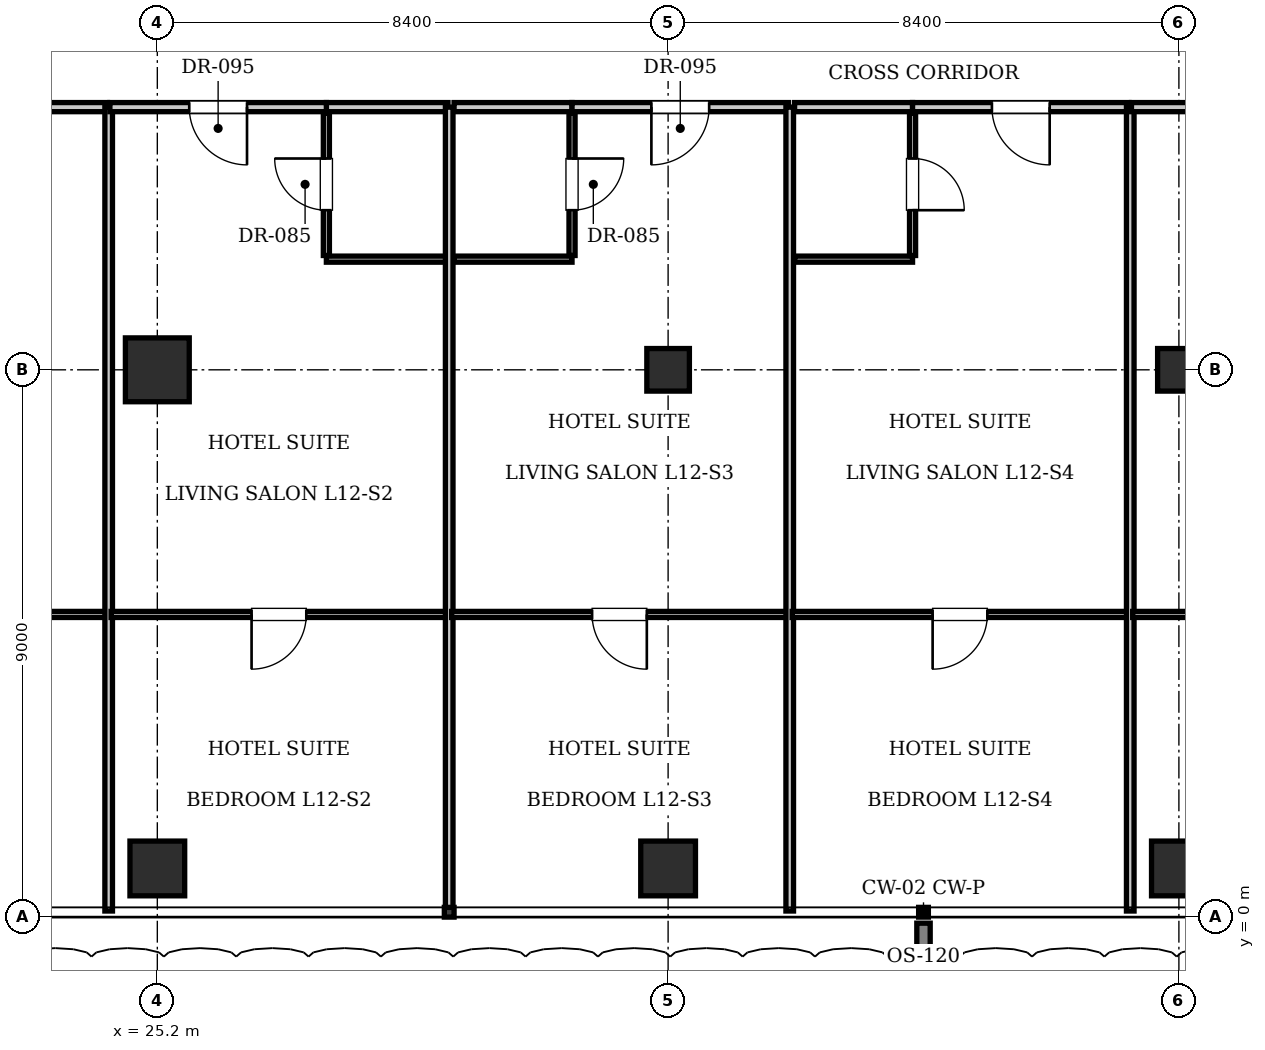
"""IFC4 building model, lengths in metres.
Left out: names, types, materials, properties, quantities, classifications, styles, units other than length and angle.
Written with IfcOpenShell. Run it as: python <this file> out.ifc"""

import sys

from ifc_helpers import new_model, si_unit, direction, frame, frame_2d, origin, origin_2d, place, context, subcontext, project, spatial, rectangle, i_section, extrude, element, fill, save


model = new_model("IFC4")
c1 = context("Model", 3, precision=1e-05, world=origin(), true_north=direction((0.0, 1.0)))
c2 = subcontext(c1, "Body", "Model", "MODEL_VIEW")
j1 = project(units=[si_unit("LENGTHUNIT", "METRE"), si_unit("PLANEANGLEUNIT", "RADIAN")], contexts=[c1])
p1 = place(None, origin())
s1 = spatial("IfcSite", under=j1, at=p1, CompositionType="ELEMENT")
p2 = place(p1, origin())
s2 = spatial("IfcBuilding", under=s1, at=p2, CompositionType="ELEMENT")
p3 = place(p2, frame((0.0, 0.0, 53.9)))
s3 = spatial("IfcBuildingStorey", under=s2, at=p3, CompositionType="ELEMENT", Elevation=53.9)
p4 = place(p3, frame((25.2, 9.0, 0.0), z_axis=(0.0, 0.0, 1.0), x_axis=(1.0, 0.0, 0.0)))
e1 = element("IfcColumn", 1, at=p4, inside=s3, PredefinedType="COLUMN", context=c2, shape_type="SweptSolid", body=[
    extrude(rectangle(XDim=1.05, YDim=1.05, at=origin_2d()), origin(), (0.0, 0.0, 1.0), 3.85),
])
for number, where, z_axis, x_axis in (
    (2, (33.6, 9.0, 0.0), (0.0, 0.0, 1.0), (1.0, 0.0, 0.0)),
    (3, (42.0, 9.0, 0.0), (0.0, 0.0, 1.0), (1.0, 0.0, 0.0)),
):
    element("IfcColumn", number, at=place(p3, frame(where, z_axis=z_axis, x_axis=x_axis)), inside=s3, PredefinedType="COLUMN", context=c2, shape_type="SweptSolid", body=[
        extrude(i_section(OverallWidth=0.7, OverallDepth=0.7, WebThickness=0.028, FlangeThickness=0.044, at=origin_2d()), origin(), (0.0, 0.0, 1.0), 3.85),
    ])
for number, where, z_axis, x_axis in (
    (4, (25.2, 0.8, 0.0), (0.0, 0.0, 1.0), (1.0, 0.0, 0.0)),
    (5, (33.6, 0.8, 0.0), (0.0, 0.0, 1.0), (1.0, 0.0, 0.0)),
    (6, (42.0, 0.8, 0.0), (0.0, 0.0, 1.0), (1.0, 0.0, 0.0)),
):
    element("IfcColumn", number, at=place(p3, frame(where, z_axis=z_axis, x_axis=x_axis)), inside=s3, PredefinedType="COLUMN", context=c2, shape_type="SweptSolid", body=[
        extrude(rectangle(XDim=0.9, YDim=0.9, at=origin_2d()), origin(), (0.0, 0.0, 1.0), 3.85),
    ])
p5 = place(p3, frame((20.82, 13.32, 0.0), z_axis=(0.0, 0.0, 1.0), x_axis=(1.0, 0.0, 0.0)))
e7 = element("IfcWall", 7, at=p5, inside=s3, PredefinedType="PARTITIONING", context=c2, shape_type="SweptSolid", body=[
    extrude(rectangle(XDim=3.56, YDim=0.15, at=frame_2d((1.78, 0.0))), origin(), (0.0, 0.0, 1.0), 3.61),
])
p6 = place(p5, frame((1.305, 0.0, 0.0)))
e8 = element("IfcOpeningElement", 8, at=p6, cuts=e7, PredefinedType="OPENING", context=c2, shape_type="SweptSolid", body=[
    extrude(rectangle(XDim=0.95, YDim=2.15, at=frame_2d((0.475, 1.075))), frame((0.0, 0.085, 0.0), z_axis=(0.0, -1.0, 0.0), x_axis=(1.0, 0.0, 0.0)), (0.0, 0.0, 1.0), 0.17),
])
p7 = place(p3, frame((18.84, 4.977, 0.0), z_axis=(0.0, 0.0, 1.0), x_axis=(1.0, 0.0, 0.0)))
e9 = element("IfcWall", 9, at=p7, inside=s3, PredefinedType="PARTITIONING", context=c2, shape_type="SweptSolid", body=[
    extrude(rectangle(XDim=5.52, YDim=0.1, at=frame_2d((2.76, 0.0))), origin(), (0.0, 0.0, 1.0), 3.61),
])
p8 = place(p7, frame((2.31, 0.0, 0.0)))
e10 = element("IfcOpeningElement", 10, at=p8, cuts=e9, PredefinedType="OPENING", context=c2, shape_type="SweptSolid", body=[
    extrude(rectangle(XDim=0.9, YDim=2.1, at=frame_2d((0.45, 1.05))), frame((0.0, 0.06, 0.0), z_axis=(0.0, -1.0, 0.0), x_axis=(1.0, 0.0, 0.0)), (0.0, 0.0, 1.0), 0.12),
])
p9 = place(p3, frame((24.4, 0.1, 0.0), z_axis=(0.0, 0.0, 1.0), x_axis=(0.0, 1.0, 0.0)))
e11 = element("IfcWall", 11, at=p9, inside=s3, PredefinedType="PARTITIONING", context=c2, shape_type="SweptSolid", body=[
    extrude(rectangle(XDim=13.22, YDim=0.125, at=frame_2d((6.61, 0.0))), origin(), (0.0, 0.0, 1.0), 3.61),
])
p10 = place(p3, frame((27.98, 13.32, 0.0), z_axis=(0.0, 0.0, 1.0), x_axis=(1.0, 0.0, 0.0)))
e12 = element("IfcWall", 12, at=p10, inside=s3, PredefinedType="PARTITIONING", context=c2, shape_type="SweptSolid", body=[
    extrude(rectangle(XDim=2.0, YDim=0.15, at=frame_2d((1.0, 0.0))), origin(), (0.0, 0.0, 1.0), 3.61),
])
p11 = place(p3, frame((27.98, 10.82, 0.0), z_axis=(0.0, 0.0, 1.0), x_axis=(1.0, 0.0, 0.0)))
e13 = element("IfcWall", 13, at=p11, inside=s3, PredefinedType="PARTITIONING", context=c2, shape_type="SweptSolid", body=[
    extrude(rectangle(XDim=1.98, YDim=0.1, at=frame_2d((0.99, 0.0))), origin(), (0.0, 0.0, 1.0), 3.61),
])
p12 = place(p3, frame((27.98, 10.88, 0.0), z_axis=(0.0, 0.0, 1.0), x_axis=(0.0, 1.0, 0.0)))
e14 = element("IfcWall", 14, at=p12, inside=s3, PredefinedType="PARTITIONING", context=c2, shape_type="SweptSolid", body=[
    extrude(rectangle(XDim=2.34, YDim=0.1, at=frame_2d((1.17, 0.0))), origin(), (0.0, 0.0, 1.0), 3.61),
])
p13 = place(p12, frame((0.745, 0.0, 0.0)))
e15 = element("IfcOpeningElement", 15, at=p13, cuts=e14, PredefinedType="OPENING", context=c2, shape_type="SweptSolid", body=[
    extrude(rectangle(XDim=0.85, YDim=2.1, at=frame_2d((0.425, 1.05))), frame((0.0, 0.06, 0.0), z_axis=(0.0, -1.0, 0.0), x_axis=(1.0, 0.0, 0.0)), (0.0, 0.0, 1.0), 0.12),
])
p14 = place(p3, frame((24.42, 13.32, 0.0), z_axis=(0.0, 0.0, 1.0), x_axis=(1.0, 0.0, 0.0)))
e16 = element("IfcWall", 16, at=p14, inside=s3, PredefinedType="PARTITIONING", context=c2, shape_type="SweptSolid", body=[
    extrude(rectangle(XDim=3.56, YDim=0.15, at=frame_2d((1.78, 0.0))), origin(), (0.0, 0.0, 1.0), 3.61),
])
p15 = place(p14, frame((1.305, 0.0, 0.0)))
e17 = element("IfcOpeningElement", 17, at=p15, cuts=e16, PredefinedType="OPENING", context=c2, shape_type="SweptSolid", body=[
    extrude(rectangle(XDim=0.95, YDim=2.15, at=frame_2d((0.475, 1.075))), frame((0.0, 0.085, 0.0), z_axis=(0.0, -1.0, 0.0), x_axis=(1.0, 0.0, 0.0)), (0.0, 0.0, 1.0), 0.17),
])
p16 = place(p3, frame((24.44, 4.977, 0.0), z_axis=(0.0, 0.0, 1.0), x_axis=(1.0, 0.0, 0.0)))
e18 = element("IfcWall", 18, at=p16, inside=s3, PredefinedType="PARTITIONING", context=c2, shape_type="SweptSolid", body=[
    extrude(rectangle(XDim=5.52, YDim=0.1, at=frame_2d((2.76, 0.0))), origin(), (0.0, 0.0, 1.0), 3.61),
])
p17 = place(p16, frame((2.31, 0.0, 0.0)))
e19 = element("IfcOpeningElement", 19, at=p17, cuts=e18, PredefinedType="OPENING", context=c2, shape_type="SweptSolid", body=[
    extrude(rectangle(XDim=0.9, YDim=2.1, at=frame_2d((0.45, 1.05))), frame((0.0, 0.06, 0.0), z_axis=(0.0, -1.0, 0.0), x_axis=(1.0, 0.0, 0.0)), (0.0, 0.0, 1.0), 0.12),
])
p18 = place(p3, frame((30.0, 0.1, 0.0), z_axis=(0.0, 0.0, 1.0), x_axis=(0.0, 1.0, 0.0)))
e20 = element("IfcWall", 20, at=p18, inside=s3, PredefinedType="PARTITIONING", context=c2, shape_type="SweptSolid", body=[
    extrude(rectangle(XDim=13.22, YDim=0.125, at=frame_2d((6.61, 0.0))), origin(), (0.0, 0.0, 1.0), 3.61),
])
p19 = place(p3, frame((30.08, 13.32, 0.0), z_axis=(0.0, 0.0, 1.0), x_axis=(1.0, 0.0, 0.0)))
e21 = element("IfcWall", 21, at=p19, inside=s3, PredefinedType="PARTITIONING", context=c2, shape_type="SweptSolid", body=[
    extrude(rectangle(XDim=1.94, YDim=0.15, at=frame_2d((0.97, 0.0))), origin(), (0.0, 0.0, 1.0), 3.61),
])
p20 = place(p3, frame((30.08, 10.82, 0.0), z_axis=(0.0, 0.0, 1.0), x_axis=(1.0, 0.0, 0.0)))
e22 = element("IfcWall", 22, at=p20, inside=s3, PredefinedType="PARTITIONING", context=c2, shape_type="SweptSolid", body=[
    extrude(rectangle(XDim=1.94, YDim=0.1, at=frame_2d((0.97, 0.0))), origin(), (0.0, 0.0, 1.0), 3.61),
])
p21 = place(p3, frame((32.02, 10.88, 0.0), z_axis=(0.0, 0.0, 1.0), x_axis=(0.0, 1.0, 0.0)))
e23 = element("IfcWall", 23, at=p21, inside=s3, PredefinedType="PARTITIONING", context=c2, shape_type="SweptSolid", body=[
    extrude(rectangle(XDim=2.34, YDim=0.1, at=frame_2d((1.17, 0.0))), origin(), (0.0, 0.0, 1.0), 3.61),
])
p22 = place(p21, frame((0.745, 0.0, 0.0)))
e24 = element("IfcOpeningElement", 24, at=p22, cuts=e23, PredefinedType="OPENING", context=c2, shape_type="SweptSolid", body=[
    extrude(rectangle(XDim=0.85, YDim=2.1, at=frame_2d((0.425, 1.05))), frame((0.0, 0.06, 0.0), z_axis=(0.0, -1.0, 0.0), x_axis=(1.0, 0.0, 0.0)), (0.0, 0.0, 1.0), 0.12),
])
p23 = place(p3, frame((32.02, 13.32, 0.0), z_axis=(0.0, 0.0, 1.0), x_axis=(1.0, 0.0, 0.0)))
e25 = element("IfcWall", 25, at=p23, inside=s3, PredefinedType="PARTITIONING", context=c2, shape_type="SweptSolid", body=[
    extrude(rectangle(XDim=3.56, YDim=0.15, at=frame_2d((1.78, 0.0))), origin(), (0.0, 0.0, 1.0), 3.61),
])
p24 = place(p23, frame((1.305, 0.0, 0.0)))
e26 = element("IfcOpeningElement", 26, at=p24, cuts=e25, PredefinedType="OPENING", context=c2, shape_type="SweptSolid", body=[
    extrude(rectangle(XDim=0.95, YDim=2.15, at=frame_2d((0.475, 1.075))), frame((0.0, 0.085, 0.0), z_axis=(0.0, -1.0, 0.0), x_axis=(1.0, 0.0, 0.0)), (0.0, 0.0, 1.0), 0.17),
])
p25 = place(p3, frame((30.04, 4.977, 0.0), z_axis=(0.0, 0.0, 1.0), x_axis=(1.0, 0.0, 0.0)))
e27 = element("IfcWall", 27, at=p25, inside=s3, PredefinedType="PARTITIONING", context=c2, shape_type="SweptSolid", body=[
    extrude(rectangle(XDim=5.52, YDim=0.1, at=frame_2d((2.76, 0.0))), origin(), (0.0, 0.0, 1.0), 3.61),
])
p26 = place(p25, frame((2.31, 0.0, 0.0)))
e28 = element("IfcOpeningElement", 28, at=p26, cuts=e27, PredefinedType="OPENING", context=c2, shape_type="SweptSolid", body=[
    extrude(rectangle(XDim=0.9, YDim=2.1, at=frame_2d((0.45, 1.05))), frame((0.0, 0.06, 0.0), z_axis=(0.0, -1.0, 0.0), x_axis=(1.0, 0.0, 0.0)), (0.0, 0.0, 1.0), 0.12),
])
p27 = place(p3, frame((35.6, 0.1, 0.0), z_axis=(0.0, 0.0, 1.0), x_axis=(0.0, 1.0, 0.0)))
e29 = element("IfcWall", 29, at=p27, inside=s3, PredefinedType="PARTITIONING", context=c2, shape_type="SweptSolid", body=[
    extrude(rectangle(XDim=13.22, YDim=0.125, at=frame_2d((6.61, 0.0))), origin(), (0.0, 0.0, 1.0), 3.61),
])
p28 = place(p3, frame((35.68, 13.32, 0.0), z_axis=(0.0, 0.0, 1.0), x_axis=(1.0, 0.0, 0.0)))
e30 = element("IfcWall", 30, at=p28, inside=s3, PredefinedType="PARTITIONING", context=c2, shape_type="SweptSolid", body=[
    extrude(rectangle(XDim=1.94, YDim=0.15, at=frame_2d((0.97, 0.0))), origin(), (0.0, 0.0, 1.0), 3.61),
])
p29 = place(p3, frame((35.68, 10.82, 0.0), z_axis=(0.0, 0.0, 1.0), x_axis=(1.0, 0.0, 0.0)))
e31 = element("IfcWall", 31, at=p29, inside=s3, PredefinedType="PARTITIONING", context=c2, shape_type="SweptSolid", body=[
    extrude(rectangle(XDim=1.94, YDim=0.1, at=frame_2d((0.97, 0.0))), origin(), (0.0, 0.0, 1.0), 3.61),
])
p30 = place(p3, frame((37.62, 10.88, 0.0), z_axis=(0.0, 0.0, 1.0), x_axis=(0.0, 1.0, 0.0)))
e32 = element("IfcWall", 32, at=p30, inside=s3, PredefinedType="PARTITIONING", context=c2, shape_type="SweptSolid", body=[
    extrude(rectangle(XDim=2.34, YDim=0.1, at=frame_2d((1.17, 0.0))), origin(), (0.0, 0.0, 1.0), 3.61),
])
p31 = place(p30, frame((0.745, 0.0, 0.0)))
e33 = element("IfcOpeningElement", 33, at=p31, cuts=e32, PredefinedType="OPENING", context=c2, shape_type="SweptSolid", body=[
    extrude(rectangle(XDim=0.85, YDim=2.1, at=frame_2d((0.425, 1.05))), frame((0.0, 0.06, 0.0), z_axis=(0.0, -1.0, 0.0), x_axis=(1.0, 0.0, 0.0)), (0.0, 0.0, 1.0), 0.12),
])
p32 = place(p3, frame((37.62, 13.32, 0.0), z_axis=(0.0, 0.0, 1.0), x_axis=(1.0, 0.0, 0.0)))
e34 = element("IfcWall", 34, at=p32, inside=s3, PredefinedType="PARTITIONING", context=c2, shape_type="SweptSolid", body=[
    extrude(rectangle(XDim=3.56, YDim=0.15, at=frame_2d((1.78, 0.0))), origin(), (0.0, 0.0, 1.0), 3.61),
])
p33 = place(p32, frame((1.305, 0.0, 0.0)))
e35 = element("IfcOpeningElement", 35, at=p33, cuts=e34, PredefinedType="OPENING", context=c2, shape_type="SweptSolid", body=[
    extrude(rectangle(XDim=0.95, YDim=2.15, at=frame_2d((0.475, 1.075))), frame((0.0, 0.085, 0.0), z_axis=(0.0, -1.0, 0.0), x_axis=(1.0, 0.0, 0.0)), (0.0, 0.0, 1.0), 0.17),
])
p34 = place(p3, frame((35.64, 4.977, 0.0), z_axis=(0.0, 0.0, 1.0), x_axis=(1.0, 0.0, 0.0)))
e36 = element("IfcWall", 36, at=p34, inside=s3, PredefinedType="PARTITIONING", context=c2, shape_type="SweptSolid", body=[
    extrude(rectangle(XDim=5.52, YDim=0.1, at=frame_2d((2.76, 0.0))), origin(), (0.0, 0.0, 1.0), 3.61),
])
p35 = place(p34, frame((2.31, 0.0, 0.0)))
e37 = element("IfcOpeningElement", 37, at=p35, cuts=e36, PredefinedType="OPENING", context=c2, shape_type="SweptSolid", body=[
    extrude(rectangle(XDim=0.9, YDim=2.1, at=frame_2d((0.45, 1.05))), frame((0.0, 0.06, 0.0), z_axis=(0.0, -1.0, 0.0), x_axis=(1.0, 0.0, 0.0)), (0.0, 0.0, 1.0), 0.12),
])
p36 = place(p3, frame((41.2, 0.1, 0.0), z_axis=(0.0, 0.0, 1.0), x_axis=(0.0, 1.0, 0.0)))
e38 = element("IfcWall", 38, at=p36, inside=s3, PredefinedType="PARTITIONING", context=c2, shape_type="SweptSolid", body=[
    extrude(rectangle(XDim=13.22, YDim=0.125, at=frame_2d((6.61, 0.0))), origin(), (0.0, 0.0, 1.0), 3.61),
])
p37 = place(p3, frame((41.22, 13.32, 0.0), z_axis=(0.0, 0.0, 1.0), x_axis=(1.0, 0.0, 0.0)))
e39 = element("IfcWall", 39, at=p37, inside=s3, PredefinedType="PARTITIONING", context=c2, shape_type="SweptSolid", body=[
    extrude(rectangle(XDim=3.56, YDim=0.15, at=frame_2d((1.78, 0.0))), origin(), (0.0, 0.0, 1.0), 3.61),
])
p38 = place(p37, frame((1.305, 0.0, 0.0)))
e40 = element("IfcOpeningElement", 40, at=p38, cuts=e39, PredefinedType="OPENING", context=c2, shape_type="SweptSolid", body=[
    extrude(rectangle(XDim=0.95, YDim=2.15, at=frame_2d((0.475, 1.075))), frame((0.0, 0.085, 0.0), z_axis=(0.0, -1.0, 0.0), x_axis=(1.0, 0.0, 0.0)), (0.0, 0.0, 1.0), 0.17),
])
p39 = place(p3, frame((41.24, 4.977, 0.0), z_axis=(0.0, 0.0, 1.0), x_axis=(1.0, 0.0, 0.0)))
e41 = element("IfcWall", 41, at=p39, inside=s3, PredefinedType="PARTITIONING", context=c2, shape_type="SweptSolid", body=[
    extrude(rectangle(XDim=5.52, YDim=0.1, at=frame_2d((2.76, 0.0))), origin(), (0.0, 0.0, 1.0), 3.61),
])
p40 = place(p39, frame((2.31, 0.0, 0.0)))
e42 = element("IfcOpeningElement", 42, at=p40, cuts=e41, PredefinedType="OPENING", context=c2, shape_type="SweptSolid", body=[
    extrude(rectangle(XDim=0.9, YDim=2.1, at=frame_2d((0.45, 1.05))), frame((0.0, 0.06, 0.0), z_axis=(0.0, -1.0, 0.0), x_axis=(1.0, 0.0, 0.0)), (0.0, 0.0, 1.0), 0.12),
])
p41 = place(p13, origin())
e43 = element("IfcDoor", 43, at=p41, inside=s3, OperationType="SINGLE_SWING_RIGHT", PredefinedType="DOOR", context=c2, shape_type="SweptSolid", body=[
    extrude(rectangle(XDim=0.85, YDim=2.1, at=frame_2d((0.425, 1.05))), frame((0.0, 0.025, 0.0), z_axis=(0.0, -1.0, 0.0), x_axis=(1.0, 0.0, 0.0)), (0.0, 0.0, 1.0), 0.05),
])
fill(e15, e43)
p42 = place(p15, frame((0.95, 0.0, 0.0), z_axis=(0.0, 0.0, 1.0), x_axis=(-1.0, 0.0, 0.0)))
e44 = element("IfcDoor", 44, at=p42, inside=s3, OperationType="SINGLE_SWING_LEFT", PredefinedType="DOOR", context=c2, shape_type="SweptSolid", body=[
    extrude(rectangle(XDim=0.95, YDim=2.15, at=frame_2d((0.475, 1.075))), frame((0.0, 0.025, 0.0), z_axis=(0.0, -1.0, 0.0), x_axis=(1.0, 0.0, 0.0)), (0.0, 0.0, 1.0), 0.05),
])
fill(e17, e44)
p43 = place(p17, frame((0.9, 0.0, 0.0), z_axis=(0.0, 0.0, 1.0), x_axis=(-1.0, 0.0, 0.0)))
e45 = element("IfcDoor", 45, at=p43, inside=s3, OperationType="SINGLE_SWING_RIGHT", PredefinedType="DOOR", context=c2, shape_type="SweptSolid", body=[
    extrude(rectangle(XDim=0.9, YDim=2.1, at=frame_2d((0.45, 1.05))), frame((0.0, 0.025, 0.0), z_axis=(0.0, -1.0, 0.0), x_axis=(1.0, 0.0, 0.0)), (0.0, 0.0, 1.0), 0.05),
])
fill(e19, e45)
p44 = place(p22, frame((0.85, 0.0, 0.0), z_axis=(0.0, 0.0, 1.0), x_axis=(-1.0, 0.0, 0.0)))
e46 = element("IfcDoor", 46, at=p44, inside=s3, OperationType="SINGLE_SWING_LEFT", PredefinedType="DOOR", context=c2, shape_type="SweptSolid", body=[
    extrude(rectangle(XDim=0.85, YDim=2.1, at=frame_2d((0.425, 1.05))), frame((0.0, 0.025, 0.0), z_axis=(0.0, -1.0, 0.0), x_axis=(1.0, 0.0, 0.0)), (0.0, 0.0, 1.0), 0.05),
])
fill(e24, e46)
p45 = place(p24, frame((0.95, 0.0, 0.0), z_axis=(0.0, 0.0, 1.0), x_axis=(-1.0, 0.0, 0.0)))
e47 = element("IfcDoor", 47, at=p45, inside=s3, OperationType="SINGLE_SWING_RIGHT", PredefinedType="DOOR", context=c2, shape_type="SweptSolid", body=[
    extrude(rectangle(XDim=0.95, YDim=2.15, at=frame_2d((0.475, 1.075))), frame((0.0, 0.025, 0.0), z_axis=(0.0, -1.0, 0.0), x_axis=(1.0, 0.0, 0.0)), (0.0, 0.0, 1.0), 0.05),
])
fill(e26, e47)
p46 = place(p26, frame((0.9, 0.0, 0.0), z_axis=(0.0, 0.0, 1.0), x_axis=(-1.0, 0.0, 0.0)))
e48 = element("IfcDoor", 48, at=p46, inside=s3, OperationType="SINGLE_SWING_LEFT", PredefinedType="DOOR", context=c2, shape_type="SweptSolid", body=[
    extrude(rectangle(XDim=0.9, YDim=2.1, at=frame_2d((0.45, 1.05))), frame((0.0, 0.025, 0.0), z_axis=(0.0, -1.0, 0.0), x_axis=(1.0, 0.0, 0.0)), (0.0, 0.0, 1.0), 0.05),
])
fill(e28, e48)
p47 = place(p31, frame((0.85, 0.0, 0.0), z_axis=(0.0, 0.0, 1.0), x_axis=(-1.0, 0.0, 0.0)))
e49 = element("IfcDoor", 49, at=p47, inside=s3, OperationType="SINGLE_SWING_RIGHT", PredefinedType="DOOR", context=c2, shape_type="SweptSolid", body=[
    extrude(rectangle(XDim=0.85, YDim=2.1, at=frame_2d((0.425, 1.05))), frame((0.0, 0.025, 0.0), z_axis=(0.0, -1.0, 0.0), x_axis=(1.0, 0.0, 0.0)), (0.0, 0.0, 1.0), 0.05),
])
fill(e33, e49)
p48 = place(p33, frame((0.95, 0.0, 0.0), z_axis=(0.0, 0.0, 1.0), x_axis=(-1.0, 0.0, 0.0)))
e50 = element("IfcDoor", 50, at=p48, inside=s3, OperationType="SINGLE_SWING_LEFT", PredefinedType="DOOR", context=c2, shape_type="SweptSolid", body=[
    extrude(rectangle(XDim=0.95, YDim=2.15, at=frame_2d((0.475, 1.075))), frame((0.0, 0.025, 0.0), z_axis=(0.0, -1.0, 0.0), x_axis=(1.0, 0.0, 0.0)), (0.0, 0.0, 1.0), 0.05),
])
fill(e35, e50)
p49 = place(p35, frame((0.9, 0.0, 0.0), z_axis=(0.0, 0.0, 1.0), x_axis=(-1.0, 0.0, 0.0)))
e51 = element("IfcDoor", 51, at=p49, inside=s3, OperationType="SINGLE_SWING_RIGHT", PredefinedType="DOOR", context=c2, shape_type="SweptSolid", body=[
    extrude(rectangle(XDim=0.9, YDim=2.1, at=frame_2d((0.45, 1.05))), frame((0.0, 0.025, 0.0), z_axis=(0.0, -1.0, 0.0), x_axis=(1.0, 0.0, 0.0)), (0.0, 0.0, 1.0), 0.05),
])
fill(e37, e51)
save(model, sys.argv[1])
